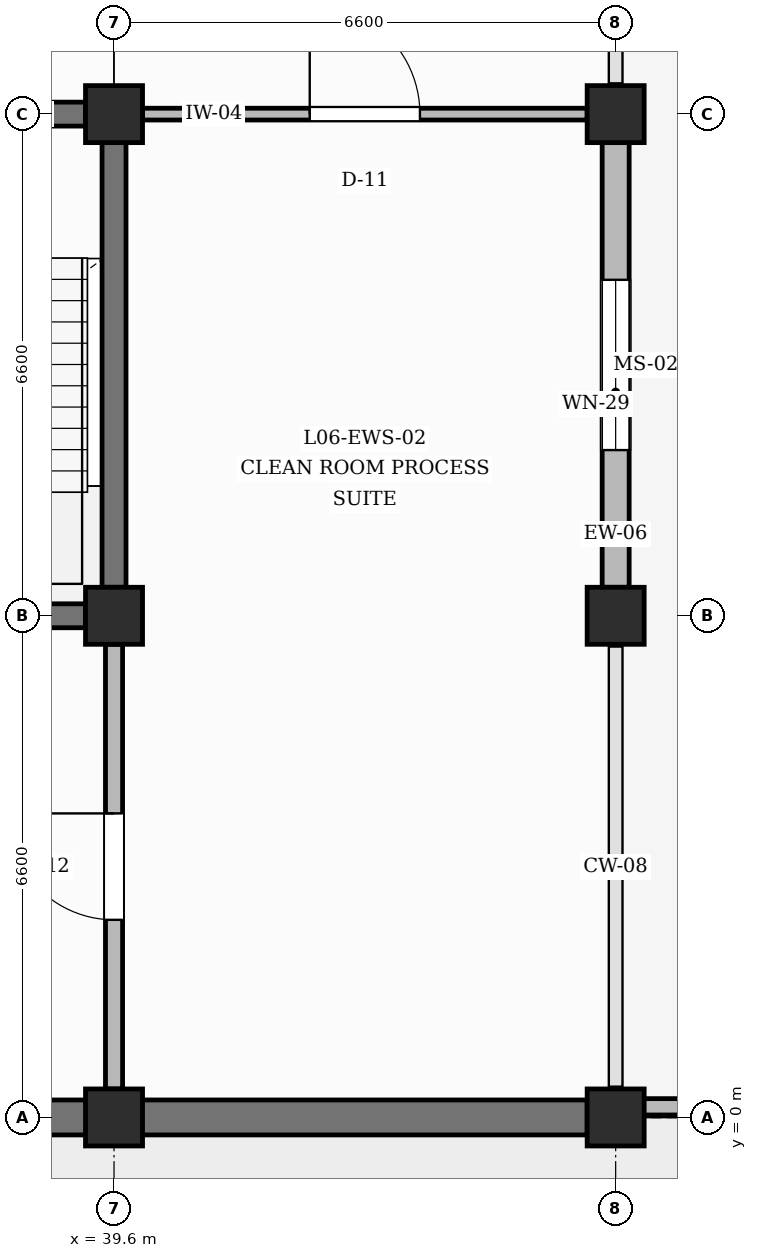
"""IFC4 building model, lengths in metres.
Left out: names, types, materials, properties, quantities, classifications, styles, units other than length and angle.
Written with IfcOpenShell. Run it as: python <this file> out.ifc"""

import sys

from ifc_helpers import new_model, si_unit, direction, frame, frame_2d, origin, origin_2d, place, context, subcontext, project, spatial, rectangle, extrude, element, fill, save


model = new_model("IFC4")
c1 = context("Model", 3, precision=1e-05, world=origin(), true_north=direction((0.0, 1.0)))
c2 = subcontext(c1, "Body", "Model", "MODEL_VIEW")
j1 = project(units=[si_unit("LENGTHUNIT", "METRE"), si_unit("PLANEANGLEUNIT", "RADIAN")], contexts=[c1])
p1 = place(None, origin())
s1 = spatial("IfcSite", under=j1, at=p1, CompositionType="ELEMENT")
p2 = place(p1, origin())
s2 = spatial("IfcBuilding", under=s1, at=p2, CompositionType="ELEMENT")
p3 = place(p2, frame((0.0, 0.0, 27.0)))
s3 = spatial("IfcBuildingStorey", under=s2, at=p3, CompositionType="ELEMENT", Elevation=27.0)
for number, where, z_axis, x_axis in (
    (1, (39.6, 0.0, 0.0), (0.0, 0.0, 1.0), (1.0, 0.0, 0.0)),
    (2, (39.6, 6.6, 0.0), (0.0, 0.0, 1.0), (1.0, 0.0, 0.0)),
    (3, (39.6, 13.2, 0.0), (0.0, 0.0, 1.0), (1.0, 0.0, 0.0)),
    (4, (46.2, 0.0, 0.0), (0.0, 0.0, 1.0), (1.0, 0.0, 0.0)),
    (5, (46.2, 6.6, 0.0), (0.0, 0.0, 1.0), (1.0, 0.0, 0.0)),
    (6, (46.2, 13.2, 0.0), (0.0, 0.0, 1.0), (1.0, 0.0, 0.0)),
):
    element("IfcColumn", number, at=place(p3, frame(where, z_axis=z_axis, x_axis=x_axis)), inside=s3, PredefinedType="COLUMN", context=c2, shape_type="SweptSolid", body=[
        extrude(rectangle(XDim=0.75, YDim=0.75, at=origin_2d()), origin(), (0.0, 0.0, 1.0), 4.2),
    ])
p4 = place(p3, frame((33.4, 0.0, 0.0), z_axis=(0.0, 0.0, 1.0), x_axis=(1.0, 0.0, 0.0)))
e7 = element("IfcWall", 7, at=p4, inside=s3, PredefinedType="SOLIDWALL", context=c2, shape_type="SweptSolid", body=[
    extrude(rectangle(XDim=5.825, YDim=0.46, at=frame_2d((2.913, 0.0))), origin(), (0.0, 0.0, 1.0), 3.27),
])
p5 = place(p3, frame((39.975, 0.0, 0.0), z_axis=(0.0, 0.0, 1.0), x_axis=(1.0, 0.0, 0.0)))
e8 = element("IfcWall", 8, at=p5, inside=s3, PredefinedType="SOLIDWALL", context=c2, shape_type="SweptSolid", body=[
    extrude(rectangle(XDim=5.85, YDim=0.46, at=frame_2d((2.925, 0.0))), origin(), (0.0, 0.0, 1.0), 3.27),
])
p6 = place(p3, frame((46.2, 6.975, 0.0), z_axis=(0.0, 0.0, 1.0), x_axis=(0.0, 1.0, 0.0)))
e9 = element("IfcWall", 9, at=p6, inside=s3, PredefinedType="SOLIDWALL", context=c2, shape_type="SweptSolid", body=[
    extrude(rectangle(XDim=5.85, YDim=0.355, at=frame_2d((2.925, 0.0))), origin(), (0.0, 0.0, 1.0), 3.27),
])
p7 = place(p6, frame((1.805, 0.0, 0.95)))
e10 = element("IfcOpeningElement", 10, at=p7, cuts=e9, PredefinedType="OPENING", context=c2, shape_type="SweptSolid", body=[
    extrude(rectangle(XDim=2.24, YDim=1.3, at=frame_2d((1.12, 0.65))), frame((0.0, 0.188, 0.0), z_axis=(0.0, -1.0, 0.0), x_axis=(1.0, 0.0, 0.0)), (0.0, 0.0, 1.0), 0.375),
])
p8 = place(p3, frame((46.34, 0.14, 0.0), z_axis=(0.0, 0.0, 1.0), x_axis=(1.0, 0.0, 0.0)))
e11 = element("IfcWall", 11, at=p8, inside=s3, PredefinedType="PARAPET", context=c2, shape_type="SweptSolid", body=[
    extrude(rectangle(XDim=6.32, YDim=0.215, at=frame_2d((3.16, 0.0))), origin(), (0.0, 0.0, 1.0), 1.15),
])
p9 = place(p3, frame((33.4, 6.6, 0.0), z_axis=(0.0, 0.0, 1.0), x_axis=(1.0, 0.0, 0.0)))
e12 = element("IfcWall", 12, at=p9, inside=s3, PredefinedType="SHEAR", context=c2, shape_type="SweptSolid", body=[
    extrude(rectangle(XDim=5.825, YDim=0.315, at=frame_2d((2.913, 0.0))), origin(), (0.0, 0.0, 1.0), 3.17),
])
p10 = place(p3, frame((33.4, 13.2, 0.0), z_axis=(0.0, 0.0, 1.0), x_axis=(1.0, 0.0, 0.0)))
e13 = element("IfcWall", 13, at=p10, inside=s3, PredefinedType="SHEAR", context=c2, shape_type="SweptSolid", body=[
    extrude(rectangle(XDim=5.825, YDim=0.315, at=frame_2d((2.913, 0.0))), origin(), (0.0, 0.0, 1.0), 3.17),
])
p11 = place(p10, frame((2.337, 0.0, 0.0)))
e14 = element("IfcOpeningElement", 14, at=p11, cuts=e13, PredefinedType="OPENING", context=c2, shape_type="SweptSolid", body=[
    extrude(rectangle(XDim=1.15, YDim=2.2, at=frame_2d((0.575, 1.1))), frame((0.0, 0.167, 0.0), z_axis=(0.0, -1.0, 0.0), x_axis=(1.0, 0.0, 0.0)), (0.0, 0.0, 1.0), 0.335),
])
p12 = place(p3, frame((39.6, 6.975, 0.0), z_axis=(0.0, 0.0, 1.0), x_axis=(0.0, 1.0, 0.0)))
e15 = element("IfcWall", 15, at=p12, inside=s3, PredefinedType="SHEAR", context=c2, shape_type="SweptSolid", body=[
    extrude(rectangle(XDim=5.85, YDim=0.315, at=frame_2d((2.925, 0.0))), origin(), (0.0, 0.0, 1.0), 3.17),
])
p13 = place(p3, frame((39.6, 0.375, 0.0), z_axis=(0.0, 0.0, 1.0), x_axis=(0.0, 1.0, 0.0)))
e16 = element("IfcWall", 16, at=p13, inside=s3, PredefinedType="PARTITIONING", context=c2, shape_type="SweptSolid", body=[
    extrude(rectangle(XDim=5.85, YDim=0.225, at=frame_2d((2.925, 0.0))), origin(), (0.0, 0.0, 1.0), 3.17),
])
p14 = place(p13, frame((2.225, 0.0, 0.0)))
e17 = element("IfcOpeningElement", 17, at=p14, cuts=e16, PredefinedType="OPENING", context=c2, shape_type="SweptSolid", body=[
    extrude(rectangle(XDim=1.4, YDim=2.25, at=frame_2d((0.7, 1.125))), frame((0.0, 0.123, 0.0), z_axis=(0.0, -1.0, 0.0), x_axis=(1.0, 0.0, 0.0)), (0.0, 0.0, 1.0), 0.245),
])
p15 = place(p3, frame((39.975, 13.2, 0.0), z_axis=(0.0, 0.0, 1.0), x_axis=(1.0, 0.0, 0.0)))
e18 = element("IfcWall", 18, at=p15, inside=s3, PredefinedType="PARTITIONING", context=c2, shape_type="SweptSolid", body=[
    extrude(rectangle(XDim=5.85, YDim=0.155, at=frame_2d((2.925, 0.0))), origin(), (0.0, 0.0, 1.0), 3.17),
])
p16 = place(p15, frame((2.2, 0.0, 0.0)))
e19 = element("IfcOpeningElement", 19, at=p16, cuts=e18, PredefinedType="OPENING", context=c2, shape_type="SweptSolid", body=[
    extrude(rectangle(XDim=1.45, YDim=2.25, at=frame_2d((0.725, 1.125))), frame((0.0, 0.087, 0.0), z_axis=(0.0, -1.0, 0.0), x_axis=(1.0, 0.0, 0.0)), (0.0, 0.0, 1.0), 0.175),
])
p17 = place(p7, origin())
e20 = element("IfcWindow", 20, at=p17, inside=s3, PartitioningType="DOUBLE_PANEL_VERTICAL", PredefinedType="WINDOW", context=c2, shape_type="SweptSolid", body=[
    extrude(rectangle(XDim=2.24, YDim=1.3, at=frame_2d((1.12, 0.65))), frame((0.0, 0.03, 0.0), z_axis=(0.0, -1.0, 0.0), x_axis=(1.0, 0.0, 0.0)), (0.0, 0.0, 1.0), 0.06),
])
fill(e10, e20)
p18 = place(p16, origin())
e21 = element("IfcDoor", 21, at=p18, inside=s3, OperationType="SINGLE_SWING_LEFT", PredefinedType="DOOR", context=c2, shape_type="SweptSolid", body=[
    extrude(rectangle(XDim=1.45, YDim=2.25, at=frame_2d((0.725, 1.125))), frame((0.0, 0.025, 0.0), z_axis=(0.0, -1.0, 0.0), x_axis=(1.0, 0.0, 0.0)), (0.0, 0.0, 1.0), 0.05),
])
fill(e19, e21)
p19 = place(p14, origin())
e22 = element("IfcDoor", 22, at=p19, inside=s3, OperationType="SINGLE_SWING_RIGHT", PredefinedType="DOOR", context=c2, shape_type="SweptSolid", body=[
    extrude(rectangle(XDim=1.4, YDim=2.25, at=frame_2d((0.7, 1.125))), frame((0.0, 0.025, 0.0), z_axis=(0.0, -1.0, 0.0), x_axis=(1.0, 0.0, 0.0)), (0.0, 0.0, 1.0), 0.05),
])
fill(e17, e22)
save(model, sys.argv[1])
